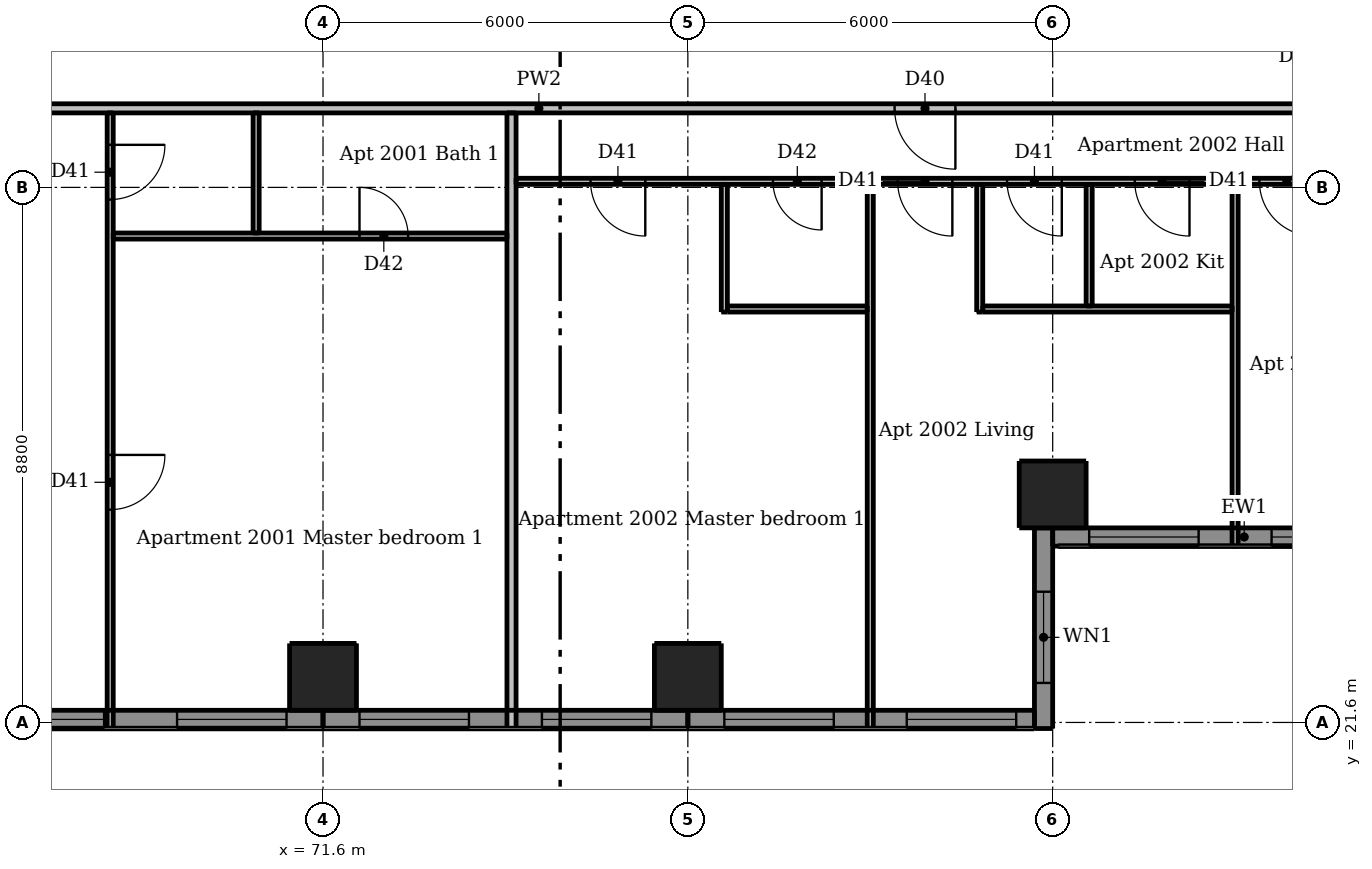
"""IFC4 building model, lengths in metres.
Left out: names, types, materials, properties, quantities, classifications, styles, units other than length and angle.
Written with IfcOpenShell. Run it as: python <this file> out.ifc"""

import sys

from ifc_helpers import new_model, si_unit, direction, frame, frame_2d, origin, origin_2d, place, context, subcontext, project, spatial, rectangle, extrude, element, fill, save


model = new_model("IFC4")
c1 = context("Model", 3, precision=1e-05, world=origin(), true_north=direction((0.0, 1.0)))
c2 = subcontext(c1, "Body", "Model", "MODEL_VIEW")
j1 = project(units=[si_unit("LENGTHUNIT", "METRE"), si_unit("PLANEANGLEUNIT", "RADIAN")], contexts=[c1])
p1 = place(None, origin())
s1 = spatial("IfcSite", under=j1, at=p1, CompositionType="ELEMENT")
p2 = place(p1, origin())
s2 = spatial("IfcBuilding", under=s1, at=p2, CompositionType="ELEMENT")
p3 = place(p2, frame((0.0, 0.0, 78.7)))
s3 = spatial("IfcBuildingStorey", under=s2, at=p3, CompositionType="ELEMENT", Elevation=78.7)
for number, where, z_axis, x_axis in (
    (1, (71.6, 22.35, 0.0), (0.0, 0.0, 1.0), (1.0, 0.0, 0.0)),
    (2, (77.6, 22.35, 0.0), (0.0, 0.0, 1.0), (1.0, 0.0, 0.0)),
    (3, (83.6, 25.35, 0.0), (0.0, 0.0, 1.0), (1.0, 0.0, 0.0)),
):
    element("IfcColumn", number, at=place(p3, frame(where, z_axis=z_axis, x_axis=x_axis)), inside=s3, PredefinedType="COLUMN", context=c2, shape_type="SweptSolid", body=[
        extrude(rectangle(XDim=1.1, YDim=1.1, at=origin_2d()), origin(), (0.0, 0.0, 1.0), 3.05),
    ])
p4 = place(p3, frame((83.45, 21.5, 0.0), z_axis=(0.0, 0.0, 1.0), x_axis=(0.0, 1.0, 0.0)))
e4 = element("IfcWall", 4, at=p4, inside=s3, PredefinedType="SOLIDWALL", context=c2, shape_type="SweptSolid", body=[
    extrude(rectangle(XDim=3.3, YDim=0.3, at=frame_2d((1.65, 0.0))), origin(), (0.0, 0.0, 1.0), 3.05),
])
p5 = place(p4, frame((0.75, 0.0, 0.9)))
e5 = element("IfcOpeningElement", 5, at=p5, cuts=e4, PredefinedType="OPENING", context=c2, shape_type="SweptSolid", body=[
    extrude(rectangle(XDim=1.5, YDim=1.5, at=frame_2d((0.75, 0.75))), frame((0.0, 0.16, 0.0), z_axis=(0.0, -1.0, 0.0), x_axis=(1.0, 0.0, 0.0)), (0.0, 0.0, 1.0), 0.32),
])
p6 = place(p3, frame((65.6, 21.65, 0.0), z_axis=(0.0, 0.0, 1.0), x_axis=(1.0, 0.0, 0.0)))
e6 = element("IfcWall", 6, at=p6, inside=s3, PredefinedType="SOLIDWALL", context=c2, shape_type="SweptSolid", body=[
    extrude(rectangle(XDim=6.0, YDim=0.3, at=frame_2d((3.0, 0.0))), origin(), (0.0, 0.0, 1.0), 3.05),
])
p7 = place(p6, frame((0.6, 0.0, 0.15)))
e7 = element("IfcOpeningElement", 7, at=p7, cuts=e6, PredefinedType="OPENING", context=c2, shape_type="SweptSolid", body=[
    extrude(rectangle(XDim=1.8, YDim=2.1, at=frame_2d((0.9, 1.05))), frame((0.0, 0.16, 0.0), z_axis=(0.0, -1.0, 0.0), x_axis=(1.0, 0.0, 0.0)), (0.0, 0.0, 1.0), 0.32),
])
p8 = place(p6, frame((3.6, 0.0, 0.15)))
e8 = element("IfcOpeningElement", 8, at=p8, cuts=e6, PredefinedType="OPENING", context=c2, shape_type="SweptSolid", body=[
    extrude(rectangle(XDim=1.8, YDim=2.1, at=frame_2d((0.9, 1.05))), frame((0.0, 0.16, 0.0), z_axis=(0.0, -1.0, 0.0), x_axis=(1.0, 0.0, 0.0)), (0.0, 0.0, 1.0), 0.32),
])
p9 = place(p3, frame((71.6, 21.65, 0.0), z_axis=(0.0, 0.0, 1.0), x_axis=(1.0, 0.0, 0.0)))
e9 = element("IfcWall", 9, at=p9, inside=s3, PredefinedType="SOLIDWALL", context=c2, shape_type="SweptSolid", body=[
    extrude(rectangle(XDim=6.0, YDim=0.3, at=frame_2d((3.0, 0.0))), origin(), (0.0, 0.0, 1.0), 3.05),
])
p10 = place(p9, frame((0.6, 0.0, 0.15)))
e10 = element("IfcOpeningElement", 10, at=p10, cuts=e9, PredefinedType="OPENING", context=c2, shape_type="SweptSolid", body=[
    extrude(rectangle(XDim=1.8, YDim=2.1, at=frame_2d((0.9, 1.05))), frame((0.0, 0.16, 0.0), z_axis=(0.0, -1.0, 0.0), x_axis=(1.0, 0.0, 0.0)), (0.0, 0.0, 1.0), 0.32),
])
p11 = place(p9, frame((3.6, 0.0, 0.15)))
e11 = element("IfcOpeningElement", 11, at=p11, cuts=e9, PredefinedType="OPENING", context=c2, shape_type="SweptSolid", body=[
    extrude(rectangle(XDim=1.8, YDim=2.1, at=frame_2d((0.9, 1.05))), frame((0.0, 0.16, 0.0), z_axis=(0.0, -1.0, 0.0), x_axis=(1.0, 0.0, 0.0)), (0.0, 0.0, 1.0), 0.32),
])
p12 = place(p3, frame((77.6, 21.65, 0.0), z_axis=(0.0, 0.0, 1.0), x_axis=(1.0, 0.0, 0.0)))
e12 = element("IfcWall", 12, at=p12, inside=s3, PredefinedType="SOLIDWALL", context=c2, shape_type="SweptSolid", body=[
    extrude(rectangle(XDim=5.7, YDim=0.3, at=frame_2d((2.85, 0.0))), origin(), (0.0, 0.0, 1.0), 3.05),
])
p13 = place(p12, frame((0.6, 0.0, 0.15)))
e13 = element("IfcOpeningElement", 13, at=p13, cuts=e12, PredefinedType="OPENING", context=c2, shape_type="SweptSolid", body=[
    extrude(rectangle(XDim=1.8, YDim=2.1, at=frame_2d((0.9, 1.05))), frame((0.0, 0.16, 0.0), z_axis=(0.0, -1.0, 0.0), x_axis=(1.0, 0.0, 0.0)), (0.0, 0.0, 1.0), 0.32),
])
p14 = place(p12, frame((3.6, 0.0, 0.15)))
e14 = element("IfcOpeningElement", 14, at=p14, cuts=e12, PredefinedType="OPENING", context=c2, shape_type="SweptSolid", body=[
    extrude(rectangle(XDim=1.8, YDim=2.1, at=frame_2d((0.9, 1.05))), frame((0.0, 0.16, 0.0), z_axis=(0.0, -1.0, 0.0), x_axis=(1.0, 0.0, 0.0)), (0.0, 0.0, 1.0), 0.32),
])
p15 = place(p3, frame((83.6, 24.65, 0.0), z_axis=(0.0, 0.0, 1.0), x_axis=(1.0, 0.0, 0.0)))
e15 = element("IfcWall", 15, at=p15, inside=s3, PredefinedType="SOLIDWALL", context=c2, shape_type="SweptSolid", body=[
    extrude(rectangle(XDim=6.3, YDim=0.3, at=frame_2d((3.15, 0.0))), origin(), (0.0, 0.0, 1.0), 3.05),
])
p16 = place(p15, frame((0.6, 0.0, 0.15)))
e16 = element("IfcOpeningElement", 16, at=p16, cuts=e15, PredefinedType="OPENING", context=c2, shape_type="SweptSolid", body=[
    extrude(rectangle(XDim=1.8, YDim=2.1, at=frame_2d((0.9, 1.05))), frame((0.0, 0.16, 0.0), z_axis=(0.0, -1.0, 0.0), x_axis=(1.0, 0.0, 0.0)), (0.0, 0.0, 1.0), 0.32),
])
p17 = place(p15, frame((3.6, 0.0, 0.15)))
e17 = element("IfcOpeningElement", 17, at=p17, cuts=e15, PredefinedType="OPENING", context=c2, shape_type="SweptSolid", body=[
    extrude(rectangle(XDim=1.8, YDim=2.1, at=frame_2d((0.9, 1.05))), frame((0.0, 0.16, 0.0), z_axis=(0.0, -1.0, 0.0), x_axis=(1.0, 0.0, 0.0)), (0.0, 0.0, 1.0), 0.32),
])
p18 = place(p3, frame((68.1, 31.625, 0.0), z_axis=(0.0, 0.0, 1.0), x_axis=(0.0, -1.0, 0.0)))
e18 = element("IfcWall", 18, at=p18, inside=s3, PredefinedType="PARTITIONING", context=c2, shape_type="SweptSolid", body=[
    extrude(rectangle(XDim=10.125, YDim=0.1, at=frame_2d((5.062, 0.0))), origin(), (0.0, 0.0, 1.0), 3.05),
])
p19 = place(p18, frame((0.525, 0.0, 0.0)))
e19 = element("IfcOpeningElement", 19, at=p19, cuts=e18, PredefinedType="OPENING", context=c2, shape_type="SweptSolid", body=[
    extrude(rectangle(XDim=0.9, YDim=2.1, at=frame_2d((0.45, 1.05))), frame((0.0, 0.06, 0.0), z_axis=(0.0, -1.0, 0.0), x_axis=(1.0, 0.0, 0.0)), (0.0, 0.0, 1.0), 0.12),
])
p20 = place(p18, frame((5.625, 0.0, 0.0)))
e20 = element("IfcOpeningElement", 20, at=p20, cuts=e18, PredefinedType="OPENING", context=c2, shape_type="SweptSolid", body=[
    extrude(rectangle(XDim=0.9, YDim=2.1, at=frame_2d((0.45, 1.05))), frame((0.0, 0.06, 0.0), z_axis=(0.0, -1.0, 0.0), x_axis=(1.0, 0.0, 0.0)), (0.0, 0.0, 1.0), 0.12),
])
p21 = place(p3, frame((70.5, 29.65, 0.0), z_axis=(0.0, 0.0, 1.0), x_axis=(0.0, 1.0, 0.0)))
e21 = element("IfcWall", 21, at=p21, inside=s3, PredefinedType="PARTITIONING", context=c2, shape_type="SweptSolid", body=[
    extrude(rectangle(XDim=1.975, YDim=0.1, at=frame_2d((0.988, 0.0))), origin(), (0.0, 0.0, 1.0), 3.05),
])
p22 = place(p3, frame((78.2, 28.35, 0.0), z_axis=(0.0, 0.0, 1.0), x_axis=(0.0, 1.0, 0.0)))
e22 = element("IfcWall", 22, at=p22, inside=s3, PredefinedType="PARTITIONING", context=c2, shape_type="SweptSolid", body=[
    extrude(rectangle(XDim=2.1, YDim=0.1, at=frame_2d((1.05, 0.0))), origin(), (0.0, 0.0, 1.0), 3.05),
])
p23 = place(p3, frame((80.6, 21.5, 0.0), z_axis=(0.0, 0.0, 1.0), x_axis=(0.0, 1.0, 0.0)))
e23 = element("IfcWall", 23, at=p23, inside=s3, PredefinedType="PARTITIONING", context=c2, shape_type="SweptSolid", body=[
    extrude(rectangle(XDim=8.95, YDim=0.1, at=frame_2d((4.475, 0.0))), origin(), (0.0, 0.0, 1.0), 3.05),
])
p24 = place(p3, frame((82.4, 28.35, 0.0), z_axis=(0.0, 0.0, 1.0), x_axis=(0.0, 1.0, 0.0)))
e24 = element("IfcWall", 24, at=p24, inside=s3, PredefinedType="PARTITIONING", context=c2, shape_type="SweptSolid", body=[
    extrude(rectangle(XDim=2.1, YDim=0.1, at=frame_2d((1.05, 0.0))), origin(), (0.0, 0.0, 1.0), 3.05),
])
p25 = place(p3, frame((84.2, 28.45, 0.0), z_axis=(0.0, 0.0, 1.0), x_axis=(0.0, 1.0, 0.0)))
e25 = element("IfcWall", 25, at=p25, inside=s3, PredefinedType="PARTITIONING", context=c2, shape_type="SweptSolid", body=[
    extrude(rectangle(XDim=2.0, YDim=0.1, at=frame_2d((1.0, 0.0))), origin(), (0.0, 0.0, 1.0), 3.05),
])
p26 = place(p3, frame((86.6, 24.5, 0.0), z_axis=(0.0, 0.0, 1.0), x_axis=(0.0, 1.0, 0.0)))
e26 = element("IfcWall", 26, at=p26, inside=s3, PredefinedType="PARTITIONING", context=c2, shape_type="SweptSolid", body=[
    extrude(rectangle(XDim=5.95, YDim=0.1, at=frame_2d((2.975, 0.0))), origin(), (0.0, 0.0, 1.0), 3.05),
])
p27 = place(p3, frame((88.25, 30.5, 0.0), z_axis=(0.0, 0.0, 1.0), x_axis=(-1.0, 0.0, 0.0)))
e27 = element("IfcWall", 27, at=p27, inside=s3, PredefinedType="PARTITIONING", context=c2, shape_type="SweptSolid", body=[
    extrude(rectangle(XDim=13.475, YDim=0.1, at=frame_2d((6.738, 0.0))), origin(), (0.0, 0.0, 1.0), 3.05),
])
p28 = place(p27, frame((6.3, 0.0, 0.0)))
e28 = element("IfcOpeningElement", 28, at=p28, cuts=e27, PredefinedType="OPENING", context=c2, shape_type="SweptSolid", body=[
    extrude(rectangle(XDim=0.9, YDim=2.1, at=frame_2d((0.45, 1.05))), frame((0.0, 0.06, 0.0), z_axis=(0.0, -1.0, 0.0), x_axis=(1.0, 0.0, 0.0)), (0.0, 0.0, 1.0), 0.12),
])
p29 = place(p27, frame((2.4, 0.0, 0.0)))
e29 = element("IfcOpeningElement", 29, at=p29, cuts=e27, PredefinedType="OPENING", context=c2, shape_type="SweptSolid", body=[
    extrude(rectangle(XDim=0.9, YDim=2.1, at=frame_2d((0.45, 1.05))), frame((0.0, 0.06, 0.0), z_axis=(0.0, -1.0, 0.0), x_axis=(1.0, 0.0, 0.0)), (0.0, 0.0, 1.0), 0.12),
])
p30 = place(p27, frame((4.5, 0.0, 0.0)))
e30 = element("IfcOpeningElement", 30, at=p30, cuts=e27, PredefinedType="OPENING", context=c2, shape_type="SweptSolid", body=[
    extrude(rectangle(XDim=0.9, YDim=2.1, at=frame_2d((0.45, 1.05))), frame((0.0, 0.06, 0.0), z_axis=(0.0, -1.0, 0.0), x_axis=(1.0, 0.0, 0.0)), (0.0, 0.0, 1.0), 0.12),
])
p31 = place(p27, frame((11.35, 0.0, 0.0)))
e31 = element("IfcOpeningElement", 31, at=p31, cuts=e27, PredefinedType="OPENING", context=c2, shape_type="SweptSolid", body=[
    extrude(rectangle(XDim=0.9, YDim=2.1, at=frame_2d((0.45, 1.05))), frame((0.0, 0.06, 0.0), z_axis=(0.0, -1.0, 0.0), x_axis=(1.0, 0.0, 0.0)), (0.0, 0.0, 1.0), 0.12),
])
p32 = place(p27, frame((0.35, 0.0, 0.0)))
e32 = element("IfcOpeningElement", 32, at=p32, cuts=e27, PredefinedType="OPENING", context=c2, shape_type="SweptSolid", body=[
    extrude(rectangle(XDim=0.9, YDim=2.1, at=frame_2d((0.45, 1.05))), frame((0.0, 0.06, 0.0), z_axis=(0.0, -1.0, 0.0), x_axis=(1.0, 0.0, 0.0)), (0.0, 0.0, 1.0), 0.12),
])
p33 = place(p27, frame((8.45, 0.0, 0.0)))
e33 = element("IfcOpeningElement", 33, at=p33, cuts=e27, PredefinedType="OPENING", context=c2, shape_type="SweptSolid", body=[
    extrude(rectangle(XDim=0.8, YDim=2.1, at=frame_2d((0.4, 1.05))), frame((0.0, 0.06, 0.0), z_axis=(0.0, -1.0, 0.0), x_axis=(1.0, 0.0, 0.0)), (0.0, 0.0, 1.0), 0.12),
])
p34 = place(p3, frame((68.15, 29.6, 0.0), z_axis=(0.0, 0.0, 1.0), x_axis=(1.0, 0.0, 0.0)))
e34 = element("IfcWall", 34, at=p34, inside=s3, PredefinedType="PARTITIONING", context=c2, shape_type="SweptSolid", body=[
    extrude(rectangle(XDim=6.475, YDim=0.1, at=frame_2d((3.238, 0.0))), origin(), (0.0, 0.0, 1.0), 3.05),
])
p35 = place(p34, frame((4.05, 0.0, 0.0)))
e35 = element("IfcOpeningElement", 35, at=p35, cuts=e34, PredefinedType="OPENING", context=c2, shape_type="SweptSolid", body=[
    extrude(rectangle(XDim=0.8, YDim=2.1, at=frame_2d((0.4, 1.05))), frame((0.0, 0.06, 0.0), z_axis=(0.0, -1.0, 0.0), x_axis=(1.0, 0.0, 0.0)), (0.0, 0.0, 1.0), 0.12),
])
p36 = place(p3, frame((78.25, 28.4, 0.0), z_axis=(0.0, 0.0, 1.0), x_axis=(1.0, 0.0, 0.0)))
e36 = element("IfcWall", 36, at=p36, inside=s3, PredefinedType="PARTITIONING", context=c2, shape_type="SweptSolid", body=[
    extrude(rectangle(XDim=2.3, YDim=0.1, at=frame_2d((1.15, 0.0))), origin(), (0.0, 0.0, 1.0), 3.05),
])
p37 = place(p3, frame((82.45, 28.4, 0.0), z_axis=(0.0, 0.0, 1.0), x_axis=(1.0, 0.0, 0.0)))
e37 = element("IfcWall", 37, at=p37, inside=s3, PredefinedType="PARTITIONING", context=c2, shape_type="SweptSolid", body=[
    extrude(rectangle(XDim=4.1, YDim=0.1, at=frame_2d((2.05, 0.0))), origin(), (0.0, 0.0, 1.0), 3.05),
])
p38 = place(p3, frame((74.7, 21.5, 0.0), z_axis=(0.0, 0.0, 1.0), x_axis=(0.0, 1.0, 0.0)))
e38 = element("IfcWall", 38, at=p38, inside=s3, PredefinedType="PARTITIONING", context=c2, shape_type="SweptSolid", body=[
    extrude(rectangle(XDim=10.125, YDim=0.15, at=frame_2d((5.062, 0.0))), origin(), (0.0, 0.0, 1.0), 3.05),
])
p39 = place(p3, frame((89.525, 31.7, 0.0), z_axis=(0.0, 0.0, 1.0), x_axis=(-1.0, 0.0, 0.0)))
e39 = element("IfcWall", 39, at=p39, inside=s3, PredefinedType="PARTITIONING", context=c2, shape_type="SweptSolid", body=[
    extrude(rectangle(XDim=28.75, YDim=0.15, at=frame_2d((14.375, 0.0))), origin(), (0.0, 0.0, 1.0), 3.05),
])
p40 = place(p39, frame((24.625, 0.0, 0.0)))
e40 = element("IfcOpeningElement", 40, at=p40, cuts=e39, PredefinedType="OPENING", context=c2, shape_type="SweptSolid", body=[
    extrude(rectangle(XDim=1.0, YDim=2.1, at=frame_2d((0.5, 1.05))), frame((0.0, 0.085, 0.0), z_axis=(0.0, -1.0, 0.0), x_axis=(1.0, 0.0, 0.0)), (0.0, 0.0, 1.0), 0.17),
])
p41 = place(p39, frame((7.525, 0.0, 0.0)))
e41 = element("IfcOpeningElement", 41, at=p41, cuts=e39, PredefinedType="OPENING", context=c2, shape_type="SweptSolid", body=[
    extrude(rectangle(XDim=1.0, YDim=2.1, at=frame_2d((0.5, 1.05))), frame((0.0, 0.085, 0.0), z_axis=(0.0, -1.0, 0.0), x_axis=(1.0, 0.0, 0.0)), (0.0, 0.0, 1.0), 0.17),
])
p42 = place(p5, origin())
e42 = element("IfcWindow", 42, at=p42, inside=s3, PartitioningType="DOUBLE_PANEL_VERTICAL", PredefinedType="WINDOW", context=c2, shape_type="SweptSolid", body=[
    extrude(rectangle(XDim=1.5, YDim=1.5, at=frame_2d((0.75, 0.75))), frame((0.0, 0.03, 0.0), z_axis=(0.0, -1.0, 0.0), x_axis=(1.0, 0.0, 0.0)), (0.0, 0.0, 1.0), 0.06),
])
fill(e5, e42)
p43 = place(p7, origin())
e43 = element("IfcWindow", 43, at=p43, inside=s3, PartitioningType="DOUBLE_PANEL_VERTICAL", PredefinedType="WINDOW", context=c2, shape_type="SweptSolid", body=[
    extrude(rectangle(XDim=1.8, YDim=2.1, at=frame_2d((0.9, 1.05))), frame((0.0, 0.03, 0.0), z_axis=(0.0, -1.0, 0.0), x_axis=(1.0, 0.0, 0.0)), (0.0, 0.0, 1.0), 0.06),
])
fill(e7, e43)
p44 = place(p8, origin())
e44 = element("IfcWindow", 44, at=p44, inside=s3, PartitioningType="DOUBLE_PANEL_VERTICAL", PredefinedType="WINDOW", context=c2, shape_type="SweptSolid", body=[
    extrude(rectangle(XDim=1.8, YDim=2.1, at=frame_2d((0.9, 1.05))), frame((0.0, 0.03, 0.0), z_axis=(0.0, -1.0, 0.0), x_axis=(1.0, 0.0, 0.0)), (0.0, 0.0, 1.0), 0.06),
])
fill(e8, e44)
p45 = place(p10, origin())
e45 = element("IfcWindow", 45, at=p45, inside=s3, PartitioningType="DOUBLE_PANEL_VERTICAL", PredefinedType="WINDOW", context=c2, shape_type="SweptSolid", body=[
    extrude(rectangle(XDim=1.8, YDim=2.1, at=frame_2d((0.9, 1.05))), frame((0.0, 0.03, 0.0), z_axis=(0.0, -1.0, 0.0), x_axis=(1.0, 0.0, 0.0)), (0.0, 0.0, 1.0), 0.06),
])
fill(e10, e45)
p46 = place(p11, origin())
e46 = element("IfcWindow", 46, at=p46, inside=s3, PartitioningType="DOUBLE_PANEL_VERTICAL", PredefinedType="WINDOW", context=c2, shape_type="SweptSolid", body=[
    extrude(rectangle(XDim=1.8, YDim=2.1, at=frame_2d((0.9, 1.05))), frame((0.0, 0.03, 0.0), z_axis=(0.0, -1.0, 0.0), x_axis=(1.0, 0.0, 0.0)), (0.0, 0.0, 1.0), 0.06),
])
fill(e11, e46)
p47 = place(p13, origin())
e47 = element("IfcWindow", 47, at=p47, inside=s3, PartitioningType="DOUBLE_PANEL_VERTICAL", PredefinedType="WINDOW", context=c2, shape_type="SweptSolid", body=[
    extrude(rectangle(XDim=1.8, YDim=2.1, at=frame_2d((0.9, 1.05))), frame((0.0, 0.03, 0.0), z_axis=(0.0, -1.0, 0.0), x_axis=(1.0, 0.0, 0.0)), (0.0, 0.0, 1.0), 0.06),
])
fill(e13, e47)
p48 = place(p14, origin())
e48 = element("IfcWindow", 48, at=p48, inside=s3, PartitioningType="DOUBLE_PANEL_VERTICAL", PredefinedType="WINDOW", context=c2, shape_type="SweptSolid", body=[
    extrude(rectangle(XDim=1.8, YDim=2.1, at=frame_2d((0.9, 1.05))), frame((0.0, 0.03, 0.0), z_axis=(0.0, -1.0, 0.0), x_axis=(1.0, 0.0, 0.0)), (0.0, 0.0, 1.0), 0.06),
])
fill(e14, e48)
p49 = place(p16, origin())
e49 = element("IfcWindow", 49, at=p49, inside=s3, PartitioningType="DOUBLE_PANEL_VERTICAL", PredefinedType="WINDOW", context=c2, shape_type="SweptSolid", body=[
    extrude(rectangle(XDim=1.8, YDim=2.1, at=frame_2d((0.9, 1.05))), frame((0.0, 0.03, 0.0), z_axis=(0.0, -1.0, 0.0), x_axis=(1.0, 0.0, 0.0)), (0.0, 0.0, 1.0), 0.06),
])
fill(e16, e49)
p50 = place(p17, origin())
e50 = element("IfcWindow", 50, at=p50, inside=s3, PartitioningType="DOUBLE_PANEL_VERTICAL", PredefinedType="WINDOW", context=c2, shape_type="SweptSolid", body=[
    extrude(rectangle(XDim=1.8, YDim=2.1, at=frame_2d((0.9, 1.05))), frame((0.0, 0.03, 0.0), z_axis=(0.0, -1.0, 0.0), x_axis=(1.0, 0.0, 0.0)), (0.0, 0.0, 1.0), 0.06),
])
fill(e17, e50)
p51 = place(p19, origin())
e51 = element("IfcDoor", 51, at=p51, inside=s3, OperationType="SINGLE_SWING_LEFT", PredefinedType="DOOR", context=c2, shape_type="SweptSolid", body=[
    extrude(rectangle(XDim=0.9, YDim=2.1, at=frame_2d((0.45, 1.05))), frame((0.0, 0.025, 0.0), z_axis=(0.0, -1.0, 0.0), x_axis=(1.0, 0.0, 0.0)), (0.0, 0.0, 1.0), 0.05),
])
fill(e19, e51)
p52 = place(p20, origin())
e52 = element("IfcDoor", 52, at=p52, inside=s3, OperationType="SINGLE_SWING_LEFT", PredefinedType="DOOR", context=c2, shape_type="SweptSolid", body=[
    extrude(rectangle(XDim=0.9, YDim=2.1, at=frame_2d((0.45, 1.05))), frame((0.0, 0.025, 0.0), z_axis=(0.0, -1.0, 0.0), x_axis=(1.0, 0.0, 0.0)), (0.0, 0.0, 1.0), 0.05),
])
fill(e20, e52)
p53 = place(p35, origin())
e53 = element("IfcDoor", 53, at=p53, inside=s3, OperationType="SINGLE_SWING_LEFT", PredefinedType="DOOR", context=c2, shape_type="SweptSolid", body=[
    extrude(rectangle(XDim=0.8, YDim=2.1, at=frame_2d((0.4, 1.05))), frame((0.0, 0.025, 0.0), z_axis=(0.0, -1.0, 0.0), x_axis=(1.0, 0.0, 0.0)), (0.0, 0.0, 1.0), 0.05),
])
fill(e35, e53)
p54 = place(p41, origin())
e54 = element("IfcDoor", 54, at=p54, inside=s3, OperationType="SINGLE_SWING_LEFT", PredefinedType="DOOR", context=c2, shape_type="SweptSolid", body=[
    extrude(rectangle(XDim=1.0, YDim=2.1, at=frame_2d((0.5, 1.05))), frame((0.0, 0.025, 0.0), z_axis=(0.0, -1.0, 0.0), x_axis=(1.0, 0.0, 0.0)), (0.0, 0.0, 1.0), 0.05),
])
fill(e41, e54)
p55 = place(p28, origin())
e55 = element("IfcDoor", 55, at=p55, inside=s3, OperationType="SINGLE_SWING_LEFT", PredefinedType="DOOR", context=c2, shape_type="SweptSolid", body=[
    extrude(rectangle(XDim=0.9, YDim=2.1, at=frame_2d((0.45, 1.05))), frame((0.0, 0.025, 0.0), z_axis=(0.0, -1.0, 0.0), x_axis=(1.0, 0.0, 0.0)), (0.0, 0.0, 1.0), 0.05),
])
fill(e28, e55)
p56 = place(p29, origin())
e56 = element("IfcDoor", 56, at=p56, inside=s3, OperationType="SINGLE_SWING_LEFT", PredefinedType="DOOR", context=c2, shape_type="SweptSolid", body=[
    extrude(rectangle(XDim=0.9, YDim=2.1, at=frame_2d((0.45, 1.05))), frame((0.0, 0.025, 0.0), z_axis=(0.0, -1.0, 0.0), x_axis=(1.0, 0.0, 0.0)), (0.0, 0.0, 1.0), 0.05),
])
fill(e29, e56)
p57 = place(p30, origin())
e57 = element("IfcDoor", 57, at=p57, inside=s3, OperationType="SINGLE_SWING_LEFT", PredefinedType="DOOR", context=c2, shape_type="SweptSolid", body=[
    extrude(rectangle(XDim=0.9, YDim=2.1, at=frame_2d((0.45, 1.05))), frame((0.0, 0.025, 0.0), z_axis=(0.0, -1.0, 0.0), x_axis=(1.0, 0.0, 0.0)), (0.0, 0.0, 1.0), 0.05),
])
fill(e30, e57)
p58 = place(p31, origin())
e58 = element("IfcDoor", 58, at=p58, inside=s3, OperationType="SINGLE_SWING_LEFT", PredefinedType="DOOR", context=c2, shape_type="SweptSolid", body=[
    extrude(rectangle(XDim=0.9, YDim=2.1, at=frame_2d((0.45, 1.05))), frame((0.0, 0.025, 0.0), z_axis=(0.0, -1.0, 0.0), x_axis=(1.0, 0.0, 0.0)), (0.0, 0.0, 1.0), 0.05),
])
fill(e31, e58)
p59 = place(p32, origin())
e59 = element("IfcDoor", 59, at=p59, inside=s3, OperationType="SINGLE_SWING_LEFT", PredefinedType="DOOR", context=c2, shape_type="SweptSolid", body=[
    extrude(rectangle(XDim=0.9, YDim=2.1, at=frame_2d((0.45, 1.05))), frame((0.0, 0.025, 0.0), z_axis=(0.0, -1.0, 0.0), x_axis=(1.0, 0.0, 0.0)), (0.0, 0.0, 1.0), 0.05),
])
fill(e32, e59)
p60 = place(p33, origin())
e60 = element("IfcDoor", 60, at=p60, inside=s3, OperationType="SINGLE_SWING_LEFT", PredefinedType="DOOR", context=c2, shape_type="SweptSolid", body=[
    extrude(rectangle(XDim=0.8, YDim=2.1, at=frame_2d((0.4, 1.05))), frame((0.0, 0.025, 0.0), z_axis=(0.0, -1.0, 0.0), x_axis=(1.0, 0.0, 0.0)), (0.0, 0.0, 1.0), 0.05),
])
fill(e33, e60)
save(model, sys.argv[1])
